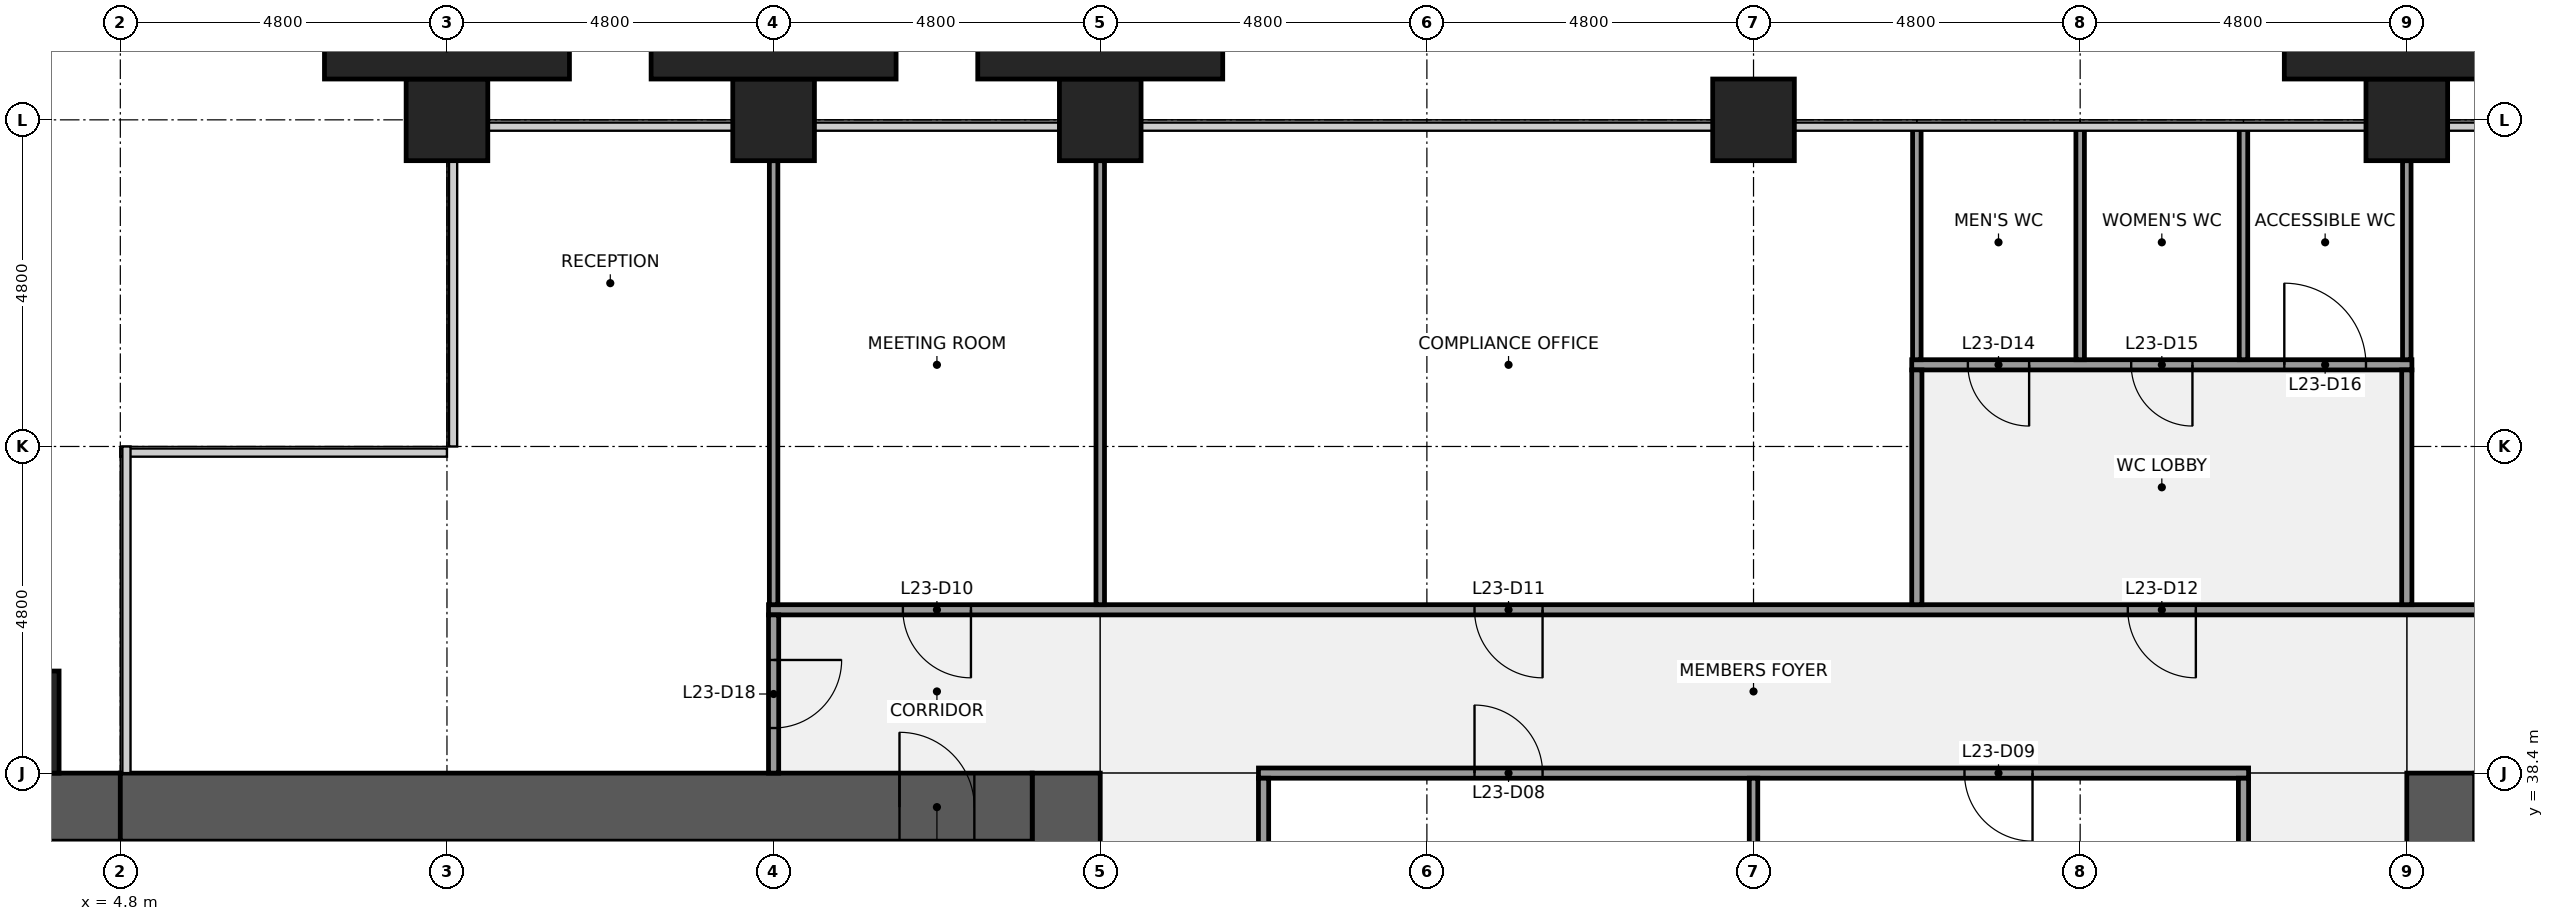
"""IFC4 building model, lengths in metres.
Left out: names, types, materials, properties, quantities, classifications, styles, units other than length and angle.
Written with IfcOpenShell. Run it as: python <this file> out.ifc"""

import sys

from ifc_helpers import new_model, si_unit, direction, frame, frame_2d, origin, origin_2d, place, context, subcontext, project, spatial, rectangle, extrude, element, fill, save


model = new_model("IFC4")
c1 = context("Model", 3, precision=1e-05, world=origin(), true_north=direction((0.0, 1.0)))
c2 = subcontext(c1, "Body", "Model", "MODEL_VIEW")
j1 = project(units=[si_unit("LENGTHUNIT", "METRE"), si_unit("PLANEANGLEUNIT", "RADIAN")], contexts=[c1])
p1 = place(None, origin())
s1 = spatial("IfcSite", under=j1, at=p1, CompositionType="ELEMENT")
p2 = place(p1, origin())
s2 = spatial("IfcBuilding", under=s1, at=p2, CompositionType="ELEMENT")
p3 = place(p2, frame((0.0, 0.0, 112.1)))
s3 = spatial("IfcBuildingStorey", under=s2, at=p3, CompositionType="ELEMENT", Elevation=112.1)
for number, where, z_axis, x_axis in (
    (1, (9.6, 48.0, 0.0), (0.0, 0.0, 1.0), (1.0, 0.0, 0.0)),
    (2, (14.4, 48.0, 0.0), (0.0, 0.0, 1.0), (1.0, 0.0, 0.0)),
    (3, (19.2, 48.0, 0.0), (0.0, 0.0, 1.0), (1.0, 0.0, 0.0)),
    (4, (28.8, 48.0, 0.0), (0.0, 0.0, 1.0), (1.0, 0.0, 0.0)),
    (5, (38.4, 48.0, 0.0), (0.0, 0.0, 1.0), (1.0, 0.0, 0.0)),
):
    element("IfcColumn", number, at=place(p3, frame(where, z_axis=z_axis, x_axis=x_axis)), inside=s3, PredefinedType="COLUMN", context=c2, shape_type="SweptSolid", body=[
        extrude(rectangle(XDim=1.2, YDim=1.2, at=origin_2d()), origin(), (0.0, 0.0, 1.0), 4.0),
    ])
p4 = place(p3, frame((18.7, 38.4, 0.0), z_axis=(0.0, 0.0, 1.0), x_axis=(0.0, -1.0, 0.0)))
e6 = element("IfcWall", 6, at=p4, inside=s3, PredefinedType="SHEAR", context=c2, shape_type="SweptSolid", body=[
    extrude(rectangle(XDim=28.8, YDim=1.0, at=frame_2d((14.4, 0.0))), origin(), (0.0, 0.0, 1.0), 3.84),
])
p5 = place(p4, frame((18.3, 0.0, 0.0)))
e7 = element("IfcOpeningElement", 7, at=p5, cuts=e6, PredefinedType="OPENING", context=c2, shape_type="SweptSolid", body=[
    extrude(rectangle(XDim=1.8, YDim=2.1, at=frame_2d((0.9, 1.05))), frame((0.0, 0.51, 0.0), z_axis=(0.0, -1.0, 0.0), x_axis=(1.0, 0.0, 0.0)), (0.0, 0.0, 1.0), 1.02),
])
p6 = place(p4, frame((8.7, 0.0, 0.0)))
e8 = element("IfcOpeningElement", 8, at=p6, cuts=e6, PredefinedType="OPENING", context=c2, shape_type="SweptSolid", body=[
    extrude(rectangle(XDim=1.8, YDim=2.1, at=frame_2d((0.9, 1.05))), frame((0.0, 0.51, 0.0), z_axis=(0.0, -1.0, 0.0), x_axis=(1.0, 0.0, 0.0)), (0.0, 0.0, 1.0), 1.02),
])
p7 = place(p3, frame((6.25, 37.3, 0.0), z_axis=(0.0, 0.0, 1.0), x_axis=(1.0, 0.0, 0.0)))
e9 = element("IfcWall", 9, at=p7, inside=s3, PredefinedType="SHEAR", context=c2, shape_type="SweptSolid", body=[
    extrude(rectangle(XDim=7.5, YDim=0.2, at=frame_2d((3.75, 0.0))), origin(), (0.0, 0.0, 1.0), 3.84),
])
p8 = place(p3, frame((1.0, 37.9, 0.0), z_axis=(0.0, 0.0, 1.0), x_axis=(1.0, 0.0, 0.0)))
e10 = element("IfcWall", 10, at=p8, inside=s3, PredefinedType="SHEAR", context=c2, shape_type="SweptSolid", body=[
    extrude(rectangle(XDim=3.8, YDim=1.0, at=frame_2d((1.9, 0.0))), origin(), (0.0, 0.0, 1.0), 3.84),
])
p9 = place(p3, frame((4.8, 37.9, 0.0), z_axis=(0.0, 0.0, 1.0), x_axis=(1.0, 0.0, 0.0)))
e11 = element("IfcWall", 11, at=p9, inside=s3, PredefinedType="SHEAR", context=c2, shape_type="SweptSolid", body=[
    extrude(rectangle(XDim=13.4, YDim=1.0, at=frame_2d((6.7, 0.0))), origin(), (0.0, 0.0, 1.0), 3.84),
])
p10 = place(p9, frame((11.45, 0.0, 0.0)))
e12 = element("IfcOpeningElement", 12, at=p10, cuts=e11, PredefinedType="OPENING", context=c2, shape_type="SweptSolid", body=[
    extrude(rectangle(XDim=1.1, YDim=2.1, at=frame_2d((0.55, 1.05))), frame((0.0, 0.51, 0.0), z_axis=(0.0, -1.0, 0.0), x_axis=(1.0, 0.0, 0.0)), (0.0, 0.0, 1.0), 1.02),
])
p11 = place(p3, frame((38.9, 9.6, 0.0), z_axis=(0.0, 0.0, 1.0), x_axis=(0.0, 1.0, 0.0)))
e13 = element("IfcWall", 13, at=p11, inside=s3, PredefinedType="SHEAR", context=c2, shape_type="SweptSolid", body=[
    extrude(rectangle(XDim=28.8, YDim=1.0, at=frame_2d((14.4, 0.0))), origin(), (0.0, 0.0, 1.0), 3.84),
])
p12 = place(p11, frame((8.7, 0.0, 0.0)))
e14 = element("IfcOpeningElement", 14, at=p12, cuts=e13, PredefinedType="OPENING", context=c2, shape_type="SweptSolid", body=[
    extrude(rectangle(XDim=1.8, YDim=2.1, at=frame_2d((0.9, 1.05))), frame((0.0, 0.51, 0.0), z_axis=(0.0, -1.0, 0.0), x_axis=(1.0, 0.0, 0.0)), (0.0, 0.0, 1.0), 1.02),
])
p13 = place(p11, frame((18.3, 0.0, 0.0)))
e15 = element("IfcOpeningElement", 15, at=p13, cuts=e13, PredefinedType="OPENING", context=c2, shape_type="SweptSolid", body=[
    extrude(rectangle(XDim=1.8, YDim=2.1, at=frame_2d((0.9, 1.05))), frame((0.0, 0.51, 0.0), z_axis=(0.0, -1.0, 0.0), x_axis=(1.0, 0.0, 0.0)), (0.0, 0.0, 1.0), 1.02),
])
p14 = place(p3, frame((21.525, 38.4, 0.0), z_axis=(0.0, 0.0, 1.0), x_axis=(1.0, 0.0, 0.0)))
e16 = element("IfcWall", 16, at=p14, inside=s3, PredefinedType="PARTITIONING", context=c2, shape_type="SweptSolid", body=[
    extrude(rectangle(XDim=14.55, YDim=0.15, at=frame_2d((7.275, 0.0))), origin(), (0.0, 0.0, 1.0), 2.849),
])
p15 = place(p14, frame((3.175, 0.0, 0.0)))
e17 = element("IfcOpeningElement", 17, at=p15, cuts=e16, PredefinedType="OPENING", context=c2, shape_type="SweptSolid", body=[
    extrude(rectangle(XDim=1.0, YDim=2.1, at=frame_2d((0.5, 1.05))), frame((0.0, 0.085, 0.0), z_axis=(0.0, -1.0, 0.0), x_axis=(1.0, 0.0, 0.0)), (0.0, 0.0, 1.0), 0.17),
])
p16 = place(p14, frame((10.375, 0.0, 0.0)))
e18 = element("IfcOpeningElement", 18, at=p16, cuts=e16, PredefinedType="OPENING", context=c2, shape_type="SweptSolid", body=[
    extrude(rectangle(XDim=1.0, YDim=2.1, at=frame_2d((0.5, 1.05))), frame((0.0, 0.085, 0.0), z_axis=(0.0, -1.0, 0.0), x_axis=(1.0, 0.0, 0.0)), (0.0, 0.0, 1.0), 0.17),
])
p17 = place(p3, frame((14.325, 40.8, 0.0), z_axis=(0.0, 0.0, 1.0), x_axis=(1.0, 0.0, 0.0)))
e19 = element("IfcWall", 19, at=p17, inside=s3, PredefinedType="PARTITIONING", context=c2, shape_type="SweptSolid", body=[
    extrude(rectangle(XDim=28.95, YDim=0.15, at=frame_2d((14.475, 0.0))), origin(), (0.0, 0.0, 1.0), 2.849),
])
p18 = place(p17, frame((1.975, 0.0, 0.0)))
e20 = element("IfcOpeningElement", 20, at=p18, cuts=e19, PredefinedType="OPENING", context=c2, shape_type="SweptSolid", body=[
    extrude(rectangle(XDim=1.0, YDim=2.1, at=frame_2d((0.5, 1.05))), frame((0.0, 0.085, 0.0), z_axis=(0.0, -1.0, 0.0), x_axis=(1.0, 0.0, 0.0)), (0.0, 0.0, 1.0), 0.17),
])
p19 = place(p17, frame((10.375, 0.0, 0.0)))
e21 = element("IfcOpeningElement", 21, at=p19, cuts=e19, PredefinedType="OPENING", context=c2, shape_type="SweptSolid", body=[
    extrude(rectangle(XDim=1.0, YDim=2.1, at=frame_2d((0.5, 1.05))), frame((0.0, 0.085, 0.0), z_axis=(0.0, -1.0, 0.0), x_axis=(1.0, 0.0, 0.0)), (0.0, 0.0, 1.0), 0.17),
])
p20 = place(p17, frame((19.975, 0.0, 0.0)))
e22 = element("IfcOpeningElement", 22, at=p20, cuts=e19, PredefinedType="OPENING", context=c2, shape_type="SweptSolid", body=[
    extrude(rectangle(XDim=1.0, YDim=2.1, at=frame_2d((0.5, 1.05))), frame((0.0, 0.085, 0.0), z_axis=(0.0, -1.0, 0.0), x_axis=(1.0, 0.0, 0.0)), (0.0, 0.0, 1.0), 0.17),
])
p21 = place(p17, frame((25.975, 0.0, 0.0)))
e23 = element("IfcOpeningElement", 23, at=p21, cuts=e19, PredefinedType="OPENING", context=c2, shape_type="SweptSolid", body=[
    extrude(rectangle(XDim=1.0, YDim=2.1, at=frame_2d((0.5, 1.05))), frame((0.0, 0.085, 0.0), z_axis=(0.0, -1.0, 0.0), x_axis=(1.0, 0.0, 0.0)), (0.0, 0.0, 1.0), 0.17),
])
p22 = place(p3, frame((31.125, 44.4, 0.0), z_axis=(0.0, 0.0, 1.0), x_axis=(1.0, 0.0, 0.0)))
e24 = element("IfcWall", 24, at=p22, inside=s3, PredefinedType="PARTITIONING", context=c2, shape_type="SweptSolid", body=[
    extrude(rectangle(XDim=7.35, YDim=0.15, at=frame_2d((3.675, 0.0))), origin(), (0.0, 0.0, 1.0), 2.849),
])
p23 = place(p22, frame((0.825, 0.0, 0.0)))
e25 = element("IfcOpeningElement", 25, at=p23, cuts=e24, PredefinedType="OPENING", context=c2, shape_type="SweptSolid", body=[
    extrude(rectangle(XDim=0.9, YDim=2.1, at=frame_2d((0.45, 1.05))), frame((0.0, 0.085, 0.0), z_axis=(0.0, -1.0, 0.0), x_axis=(1.0, 0.0, 0.0)), (0.0, 0.0, 1.0), 0.17),
])
p24 = place(p22, frame((3.225, 0.0, 0.0)))
e26 = element("IfcOpeningElement", 26, at=p24, cuts=e24, PredefinedType="OPENING", context=c2, shape_type="SweptSolid", body=[
    extrude(rectangle(XDim=0.9, YDim=2.1, at=frame_2d((0.45, 1.05))), frame((0.0, 0.085, 0.0), z_axis=(0.0, -1.0, 0.0), x_axis=(1.0, 0.0, 0.0)), (0.0, 0.0, 1.0), 0.17),
])
p25 = place(p22, frame((5.475, 0.0, 0.0)))
e27 = element("IfcOpeningElement", 27, at=p25, cuts=e24, PredefinedType="OPENING", context=c2, shape_type="SweptSolid", body=[
    extrude(rectangle(XDim=1.2, YDim=2.1, at=frame_2d((0.6, 1.05))), frame((0.0, 0.085, 0.0), z_axis=(0.0, -1.0, 0.0), x_axis=(1.0, 0.0, 0.0)), (0.0, 0.0, 1.0), 0.17),
])
p26 = place(p3, frame((14.4, 40.875, 0.0), z_axis=(0.0, 0.0, 1.0), x_axis=(0.0, 1.0, 0.0)))
e28 = element("IfcWall", 28, at=p26, inside=s3, PredefinedType="PARTITIONING", context=c2, shape_type="SweptSolid", body=[
    extrude(rectangle(XDim=6.525, YDim=0.125, at=frame_2d((3.262, 0.0))), origin(), (0.0, 0.0, 1.0), 2.849),
])
p27 = place(p3, frame((14.4, 38.4, 0.0), z_axis=(0.0, 0.0, 1.0), x_axis=(0.0, 1.0, 0.0)))
e29 = element("IfcWall", 29, at=p27, inside=s3, PredefinedType="PARTITIONING", context=c2, shape_type="SweptSolid", body=[
    extrude(rectangle(XDim=2.325, YDim=0.15, at=frame_2d((1.163, 0.0))), origin(), (0.0, 0.0, 1.0), 2.849),
])
p28 = place(p27, frame((0.663, 0.0, 0.0)))
e30 = element("IfcOpeningElement", 30, at=p28, cuts=e29, PredefinedType="OPENING", context=c2, shape_type="SweptSolid", body=[
    extrude(rectangle(XDim=1.0, YDim=2.1, at=frame_2d((0.5, 1.05))), frame((0.0, 0.085, 0.0), z_axis=(0.0, -1.0, 0.0), x_axis=(1.0, 0.0, 0.0)), (0.0, 0.0, 1.0), 0.17),
])
p29 = place(p3, frame((19.2, 40.875, 0.0), z_axis=(0.0, 0.0, 1.0), x_axis=(0.0, 1.0, 0.0)))
e31 = element("IfcWall", 31, at=p29, inside=s3, PredefinedType="PARTITIONING", context=c2, shape_type="SweptSolid", body=[
    extrude(rectangle(XDim=6.525, YDim=0.125, at=frame_2d((3.262, 0.0))), origin(), (0.0, 0.0, 1.0), 2.849),
])
p30 = place(p3, frame((21.6, 33.675, 0.0), z_axis=(0.0, 0.0, 1.0), x_axis=(0.0, 1.0, 0.0)))
e32 = element("IfcWall", 32, at=p30, inside=s3, PredefinedType="PARTITIONING", context=c2, shape_type="SweptSolid", body=[
    extrude(rectangle(XDim=4.65, YDim=0.15, at=frame_2d((2.325, 0.0))), origin(), (0.0, 0.0, 1.0), 2.849),
])
p31 = place(p3, frame((28.8, 33.663, 0.0), z_axis=(0.0, 0.0, 1.0), x_axis=(0.0, 1.0, 0.0)))
e33 = element("IfcWall", 33, at=p31, inside=s3, PredefinedType="PARTITIONING", context=c2, shape_type="SweptSolid", body=[
    extrude(rectangle(XDim=4.662, YDim=0.125, at=frame_2d((2.331, 0.0))), origin(), (0.0, 0.0, 1.0), 2.849),
])
p32 = place(p3, frame((31.2, 44.475, 0.0), z_axis=(0.0, 0.0, 1.0), x_axis=(0.0, 1.0, 0.0)))
e34 = element("IfcWall", 34, at=p32, inside=s3, PredefinedType="PARTITIONING", context=c2, shape_type="SweptSolid", body=[
    extrude(rectangle(XDim=3.425, YDim=0.125, at=frame_2d((1.712, 0.0))), origin(), (0.0, 0.0, 1.0), 2.849),
])
p33 = place(p3, frame((31.2, 40.875, 0.0), z_axis=(0.0, 0.0, 1.0), x_axis=(0.0, 1.0, 0.0)))
e35 = element("IfcWall", 35, at=p33, inside=s3, PredefinedType="PARTITIONING", context=c2, shape_type="SweptSolid", body=[
    extrude(rectangle(XDim=3.45, YDim=0.15, at=frame_2d((1.725, 0.0))), origin(), (0.0, 0.0, 1.0), 2.849),
])
for number, where, z_axis, x_axis in (
    (36, (33.6, 44.475, 0.0), (0.0, 0.0, 1.0), (0.0, 1.0, 0.0)),
    (37, (36.0, 44.475, 0.0), (0.0, 0.0, 1.0), (0.0, 1.0, 0.0)),
):
    element("IfcWall", number, at=place(p3, frame(where, z_axis=z_axis, x_axis=x_axis)), inside=s3, PredefinedType="PARTITIONING", context=c2, shape_type="SweptSolid", body=[
        extrude(rectangle(XDim=3.425, YDim=0.125, at=frame_2d((1.712, 0.0))), origin(), (0.0, 0.0, 1.0), 2.849),
    ])
p34 = place(p3, frame((36.0, 33.675, 0.0), z_axis=(0.0, 0.0, 1.0), x_axis=(0.0, 1.0, 0.0)))
e38 = element("IfcWall", 38, at=p34, inside=s3, PredefinedType="PARTITIONING", context=c2, shape_type="SweptSolid", body=[
    extrude(rectangle(XDim=4.65, YDim=0.15, at=frame_2d((2.325, 0.0))), origin(), (0.0, 0.0, 1.0), 2.849),
])
p35 = place(p3, frame((38.4, 44.475, 0.0), z_axis=(0.0, 0.0, 1.0), x_axis=(0.0, 1.0, 0.0)))
e39 = element("IfcWall", 39, at=p35, inside=s3, PredefinedType="PARTITIONING", context=c2, shape_type="SweptSolid", body=[
    extrude(rectangle(XDim=2.925, YDim=0.125, at=frame_2d((1.462, 0.0))), origin(), (0.0, 0.0, 1.0), 2.849),
])
p36 = place(p3, frame((38.4, 40.875, 0.0), z_axis=(0.0, 0.0, 1.0), x_axis=(0.0, 1.0, 0.0)))
e40 = element("IfcWall", 40, at=p36, inside=s3, PredefinedType="PARTITIONING", context=c2, shape_type="SweptSolid", body=[
    extrude(rectangle(XDim=3.45, YDim=0.15, at=frame_2d((1.725, 0.0))), origin(), (0.0, 0.0, 1.0), 2.849),
])
p37 = place(p3, frame((2.4, 39.15, 0.0), z_axis=(0.0, 0.0, 1.0), x_axis=(1.0, 0.0, 0.0)))
e41 = element("IfcColumn", 41, at=p37, inside=s3, PredefinedType="PILASTER", context=c2, shape_type="SweptSolid", body=[
    extrude(rectangle(XDim=3.0, YDim=1.5, at=origin_2d()), origin(), (0.0, 0.0, 1.0), 4.0),
])
for number, where, z_axis, x_axis in (
    (42, (9.6, 49.05, 0.0), (0.0, 0.0, 1.0), (1.0, 0.0, 0.0)),
    (43, (14.4, 49.05, 0.0), (0.0, 0.0, 1.0), (1.0, 0.0, 0.0)),
    (44, (19.2, 49.05, 0.0), (0.0, 0.0, 1.0), (1.0, 0.0, 0.0)),
    (45, (38.4, 49.05, 0.0), (0.0, 0.0, 1.0), (1.0, 0.0, 0.0)),
):
    element("IfcColumn", number, at=place(p3, frame(where, z_axis=z_axis, x_axis=x_axis)), inside=s3, PredefinedType="PILASTER", context=c2, shape_type="SweptSolid", body=[
        extrude(rectangle(XDim=3.6, YDim=0.9, at=origin_2d()), origin(), (0.0, 0.0, 1.0), 4.0),
    ])
p38 = place(p10, origin())
e46 = element("IfcDoor", 46, at=p38, inside=s3, OperationType="SINGLE_SWING_LEFT", PredefinedType="DOOR", context=c2, shape_type="SweptSolid", body=[
    extrude(rectangle(XDim=1.1, YDim=2.1, at=frame_2d((0.55, 1.05))), frame((0.0, 0.025, 0.0), z_axis=(0.0, -1.0, 0.0), x_axis=(1.0, 0.0, 0.0)), (0.0, 0.0, 1.0), 0.05),
])
fill(e12, e46)
p39 = place(p15, origin())
e47 = element("IfcDoor", 47, at=p39, inside=s3, OperationType="SINGLE_SWING_LEFT", PredefinedType="DOOR", context=c2, shape_type="SweptSolid", body=[
    extrude(rectangle(XDim=1.0, YDim=2.1, at=frame_2d((0.5, 1.05))), frame((0.0, 0.025, 0.0), z_axis=(0.0, -1.0, 0.0), x_axis=(1.0, 0.0, 0.0)), (0.0, 0.0, 1.0), 0.05),
])
fill(e17, e47)
p40 = place(p16, origin())
e48 = element("IfcDoor", 48, at=p40, inside=s3, OperationType="SINGLE_SWING_RIGHT", PredefinedType="DOOR", context=c2, shape_type="SweptSolid", body=[
    extrude(rectangle(XDim=1.0, YDim=2.1, at=frame_2d((0.5, 1.05))), frame((0.0, 0.025, 0.0), z_axis=(0.0, -1.0, 0.0), x_axis=(1.0, 0.0, 0.0)), (0.0, 0.0, 1.0), 0.05),
])
fill(e18, e48)
p41 = place(p18, origin())
e49 = element("IfcDoor", 49, at=p41, inside=s3, OperationType="SINGLE_SWING_RIGHT", PredefinedType="DOOR", context=c2, shape_type="SweptSolid", body=[
    extrude(rectangle(XDim=1.0, YDim=2.1, at=frame_2d((0.5, 1.05))), frame((0.0, 0.025, 0.0), z_axis=(0.0, -1.0, 0.0), x_axis=(1.0, 0.0, 0.0)), (0.0, 0.0, 1.0), 0.05),
])
fill(e20, e49)
p42 = place(p19, origin())
e50 = element("IfcDoor", 50, at=p42, inside=s3, OperationType="SINGLE_SWING_RIGHT", PredefinedType="DOOR", context=c2, shape_type="SweptSolid", body=[
    extrude(rectangle(XDim=1.0, YDim=2.1, at=frame_2d((0.5, 1.05))), frame((0.0, 0.025, 0.0), z_axis=(0.0, -1.0, 0.0), x_axis=(1.0, 0.0, 0.0)), (0.0, 0.0, 1.0), 0.05),
])
fill(e21, e50)
p43 = place(p20, origin())
e51 = element("IfcDoor", 51, at=p43, inside=s3, OperationType="SINGLE_SWING_RIGHT", PredefinedType="DOOR", context=c2, shape_type="SweptSolid", body=[
    extrude(rectangle(XDim=1.0, YDim=2.1, at=frame_2d((0.5, 1.05))), frame((0.0, 0.025, 0.0), z_axis=(0.0, -1.0, 0.0), x_axis=(1.0, 0.0, 0.0)), (0.0, 0.0, 1.0), 0.05),
])
fill(e22, e51)
p44 = place(p23, origin())
e52 = element("IfcDoor", 52, at=p44, inside=s3, OperationType="SINGLE_SWING_RIGHT", PredefinedType="DOOR", context=c2, shape_type="SweptSolid", body=[
    extrude(rectangle(XDim=0.9, YDim=2.1, at=frame_2d((0.45, 1.05))), frame((0.0, 0.025, 0.0), z_axis=(0.0, -1.0, 0.0), x_axis=(1.0, 0.0, 0.0)), (0.0, 0.0, 1.0), 0.05),
])
fill(e25, e52)
p45 = place(p24, origin())
e53 = element("IfcDoor", 53, at=p45, inside=s3, OperationType="SINGLE_SWING_RIGHT", PredefinedType="DOOR", context=c2, shape_type="SweptSolid", body=[
    extrude(rectangle(XDim=0.9, YDim=2.1, at=frame_2d((0.45, 1.05))), frame((0.0, 0.025, 0.0), z_axis=(0.0, -1.0, 0.0), x_axis=(1.0, 0.0, 0.0)), (0.0, 0.0, 1.0), 0.05),
])
fill(e26, e53)
p46 = place(p25, origin())
e54 = element("IfcDoor", 54, at=p46, inside=s3, OperationType="SINGLE_SWING_LEFT", PredefinedType="DOOR", context=c2, shape_type="SweptSolid", body=[
    extrude(rectangle(XDim=1.2, YDim=2.1, at=frame_2d((0.6, 1.05))), frame((0.0, 0.025, 0.0), z_axis=(0.0, -1.0, 0.0), x_axis=(1.0, 0.0, 0.0)), (0.0, 0.0, 1.0), 0.05),
])
fill(e27, e54)
p47 = place(p28, origin())
e55 = element("IfcDoor", 55, at=p47, inside=s3, OperationType="SINGLE_SWING_RIGHT", PredefinedType="DOOR", context=c2, shape_type="SweptSolid", body=[
    extrude(rectangle(XDim=1.0, YDim=2.1, at=frame_2d((0.5, 1.05))), frame((0.0, 0.025, 0.0), z_axis=(0.0, -1.0, 0.0), x_axis=(1.0, 0.0, 0.0)), (0.0, 0.0, 1.0), 0.05),
])
fill(e30, e55)
save(model, sys.argv[1])
